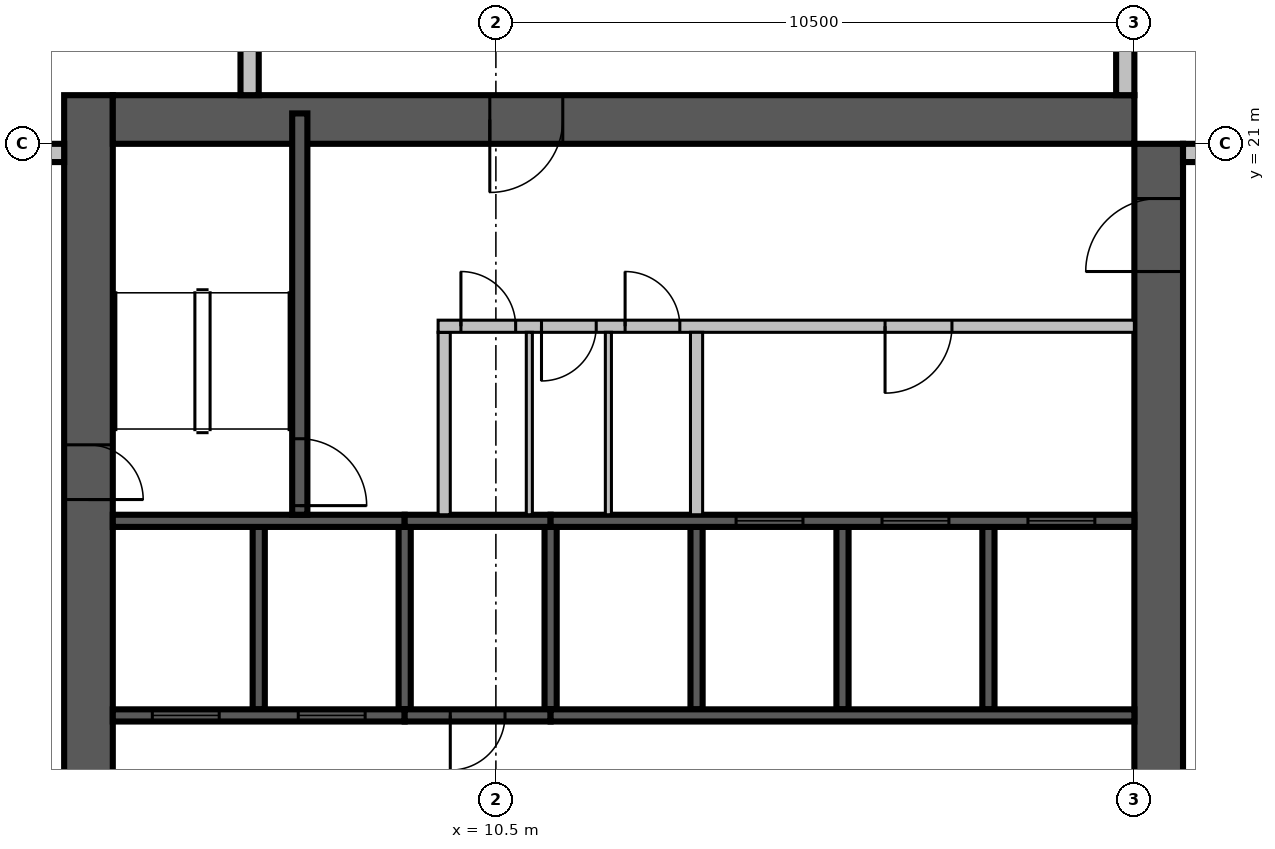
"""IFC4 building model, lengths in metres.
Left out: names, types, materials, properties, quantities, classifications, styles, units other than length and angle.
Written with IfcOpenShell. Run it as: python <this file> out.ifc"""

import sys

from ifc_helpers import new_model, si_unit, direction, frame, frame_2d, origin, place, context, subcontext, project, spatial, rectangle, extrude, source, transform, mapped, element, fill, save


model = new_model("IFC4")
c1 = context("Model", 3, precision=1e-05, world=origin(), true_north=direction((0.0, 1.0)))
c2 = subcontext(c1, "Body", "Model", "MODEL_VIEW")
j1 = project(units=[si_unit("LENGTHUNIT", "METRE"), si_unit("PLANEANGLEUNIT", "RADIAN")], contexts=[c1])
p1 = place(None, origin())
s1 = spatial("IfcSite", under=j1, at=p1, CompositionType="ELEMENT")
p2 = place(p1, origin())
s2 = spatial("IfcBuilding", under=s1, at=p2, CompositionType="ELEMENT")
p3 = place(p2, frame((0.0, 0.0, 177.8)))
s3 = spatial("IfcBuildingStorey", under=s2, at=p3, CompositionType="ELEMENT", Elevation=177.8)
p4 = place(p3, frame((3.8, 4.2, 0.0), z_axis=(0.0, 0.0, 1.0), x_axis=(0.0, 1.0, 0.0)))
e1 = element("IfcWall", 1, at=p4, inside=s3, PredefinedType="SHEAR", context=c2, shape_type="SweptSolid", body=[
    extrude(rectangle(XDim=17.6, YDim=0.8, at=frame_2d((8.8, 0.0))), origin(), (0.0, 0.0, 1.0), 3.8),
])
m1 = source(origin(), c2, "Body", "SweptSolid", [
    extrude(rectangle(XDim=2.2, YDim=2.1, at=frame_2d((1.1, 1.05))), frame((0.0, 0.41, 0.0), z_axis=(0.0, -1.0, 0.0), x_axis=(1.0, 0.0, 0.0)), (0.0, 0.0, 1.0), 0.82),
])
p5 = place(p4, frame((4.2, 0.0, 0.0)))
e2 = element("IfcOpeningElement", 2, at=p5, cuts=e1, PredefinedType="OPENING", context=c2, shape_type="MappedRepresentation", body=[
    mapped(m1, transform((0.0, 0.0, 0.0), scale=1.0)),
])
p6 = place(p4, frame((10.95, 0.0, 0.0)))
e3 = element("IfcOpeningElement", 3, at=p6, cuts=e1, PredefinedType="OPENING", context=c2, shape_type="SweptSolid", body=[
    extrude(rectangle(XDim=0.9, YDim=2.1, at=frame_2d((0.45, 1.05))), frame((0.0, 0.41, 0.0), z_axis=(0.0, -1.0, 0.0), x_axis=(1.0, 0.0, 0.0)), (0.0, 0.0, 1.0), 0.82),
])
p7 = place(p3, frame((21.4, 4.2, 0.0), z_axis=(0.0, 0.0, 1.0), x_axis=(0.0, 1.0, 0.0)))
e4 = element("IfcWall", 4, at=p7, inside=s3, PredefinedType="SHEAR", context=c2, shape_type="SweptSolid", body=[
    extrude(rectangle(XDim=16.8, YDim=0.8, at=frame_2d((8.4, 0.0))), origin(), (0.0, 0.0, 1.0), 3.8),
])
p8 = place(p7, frame((4.2, 0.0, 0.0)))
e5 = element("IfcOpeningElement", 5, at=p8, cuts=e4, PredefinedType="OPENING", context=c2, shape_type="SweptSolid", body=[
    extrude(rectangle(XDim=2.2, YDim=2.1, at=frame_2d((1.1, 1.05))), frame((0.0, 0.41, 0.0), z_axis=(0.0, -1.0, 0.0), x_axis=(1.0, 0.0, 0.0)), (0.0, 0.0, 1.0), 0.82),
])
m2 = source(origin(), c2, "Body", "SweptSolid", [
    extrude(rectangle(XDim=1.2, YDim=2.1, at=frame_2d((0.6, 1.05))), frame((0.0, 0.41, 0.0), z_axis=(0.0, -1.0, 0.0), x_axis=(1.0, 0.0, 0.0)), (0.0, 0.0, 1.0), 0.82),
])
p9 = place(p7, frame((14.7, 0.0, 0.0)))
e6 = element("IfcOpeningElement", 6, at=p9, cuts=e4, PredefinedType="OPENING", context=c2, shape_type="MappedRepresentation", body=[
    mapped(m2, transform((0.0, 0.0, 0.0), scale=1.0)),
])
m3 = source(origin(), c2, "Body", "SweptSolid", [
    extrude(rectangle(XDim=16.8, YDim=0.8, at=frame_2d((8.4, 0.0))), origin(), (0.0, 0.0, 1.0), 3.8),
])
p10 = place(p3, frame((4.2, 21.4, 0.0), z_axis=(0.0, 0.0, 1.0), x_axis=(1.0, 0.0, 0.0)))
e7 = element("IfcWall", 7, at=p10, inside=s3, PredefinedType="SHEAR", context=c2, shape_type="MappedRepresentation", body=[
    mapped(m3, transform((0.0, 0.0, 0.0), scale=1.0)),
])
p11 = place(p10, frame((6.2, 0.0, 0.0)))
e8 = element("IfcOpeningElement", 8, at=p11, cuts=e7, PredefinedType="OPENING", context=c2, shape_type="SweptSolid", body=[
    extrude(rectangle(XDim=1.2, YDim=2.1, at=frame_2d((0.6, 1.05))), frame((0.0, 0.41, 0.0), z_axis=(0.0, -1.0, 0.0), x_axis=(1.0, 0.0, 0.0)), (0.0, 0.0, 1.0), 0.82),
])
p12 = place(p3, frame((28.95, 20.85, 0.0), z_axis=(0.0, 0.0, 1.0), x_axis=(-1.0, 0.0, 0.0)))
e9 = element("IfcWall", 9, at=p12, inside=s3, PredefinedType="STANDARD", context=c2, shape_type="SweptSolid", body=[
    extrude(rectangle(XDim=7.15, YDim=0.3, at=frame_2d((3.575, 0.0))), origin(), (0.0, 0.0, 1.0), 3.4),
])
m4 = source(origin(), c2, "Body", "SweptSolid", [
    extrude(rectangle(XDim=3.0, YDim=2.3, at=frame_2d((1.5, 1.15))), frame((0.0, 0.16, 0.0), z_axis=(0.0, -1.0, 0.0), x_axis=(1.0, 0.0, 0.0)), (0.0, 0.0, 1.0), 0.32),
])
p13 = place(p12, frame((0.15, 0.0, 0.6)))
e10 = element("IfcOpeningElement", 10, at=p13, cuts=e9, PredefinedType="OPENING", context=c2, shape_type="MappedRepresentation", body=[
    mapped(m4, transform((0.0, 0.0, 0.0), scale=1.0)),
])
m5 = source(origin(), c2, "Body", "SweptSolid", [
    extrude(rectangle(XDim=7.15, YDim=0.3, at=frame_2d((3.575, 0.0))), origin(), (0.0, 0.0, 1.0), 3.4),
])
p14 = place(p3, frame((20.85, 21.8, 0.0), z_axis=(0.0, 0.0, 1.0), x_axis=(0.0, 1.0, 0.0)))
e11 = element("IfcWall", 11, at=p14, inside=s3, PredefinedType="STANDARD", context=c2, shape_type="MappedRepresentation", body=[
    mapped(m5, transform((0.0, 0.0, 0.0), scale=1.0)),
])
p15 = place(p14, frame((4.0, 0.0, 0.6)))
e12 = element("IfcOpeningElement", 12, at=p15, cuts=e11, PredefinedType="OPENING", context=c2, shape_type="MappedRepresentation", body=[
    mapped(m4, transform((0.0, 0.0, 0.0), scale=1.0)),
])
p16 = place(p3, frame((6.45, 38.4, 0.0), z_axis=(0.0, 0.0, 1.0), x_axis=(0.0, -1.0, 0.0)))
e13 = element("IfcWall", 13, at=p16, inside=s3, PredefinedType="STANDARD", context=c2, shape_type="SweptSolid", body=[
    extrude(rectangle(XDim=16.6, YDim=0.3, at=frame_2d((8.3, 0.0))), origin(), (0.0, 0.0, 1.0), 3.4),
])
m6 = source(origin(), c2, "Body", "SweptSolid", [
    extrude(rectangle(XDim=1.8, YDim=2.3, at=frame_2d((0.9, 1.15))), frame((0.0, 0.16, 0.0), z_axis=(0.0, -1.0, 0.0), x_axis=(1.0, 0.0, 0.0)), (0.0, 0.0, 1.0), 0.32),
])
p17 = place(p16, frame((1.15, 0.0, 0.6)))
e14 = element("IfcOpeningElement", 14, at=p17, cuts=e13, PredefinedType="OPENING", context=c2, shape_type="MappedRepresentation", body=[
    mapped(m6, transform((0.0, 0.0, 0.0), scale=1.0)),
])
p18 = place(p16, frame((5.162, 0.0, 0.6)))
e15 = element("IfcOpeningElement", 15, at=p18, cuts=e13, PredefinedType="OPENING", context=c2, shape_type="MappedRepresentation", body=[
    mapped(m6, transform((0.0, 0.0, 0.0), scale=1.0)),
])
p19 = place(p16, frame((9.438, 0.0, 0.6)))
e16 = element("IfcOpeningElement", 16, at=p19, cuts=e13, PredefinedType="OPENING", context=c2, shape_type="MappedRepresentation", body=[
    mapped(m6, transform((0.0, 0.0, 0.0), scale=1.0)),
])
m7 = source(origin(), c2, "Body", "SweptSolid", [
    extrude(rectangle(XDim=1.2, YDim=2.3, at=frame_2d((0.6, 1.15))), frame((0.0, 0.16, 0.0), z_axis=(0.0, -1.0, 0.0), x_axis=(1.0, 0.0, 0.0)), (0.0, 0.0, 1.0), 0.32),
])
p20 = place(p16, frame((13.012, 0.0, 0.6)))
e17 = element("IfcOpeningElement", 17, at=p20, cuts=e13, PredefinedType="OPENING", context=c2, shape_type="MappedRepresentation", body=[
    mapped(m7, transform((0.0, 0.0, 0.0), scale=1.0)),
])
p21 = place(p3, frame((3.4, 20.85, 0.0), z_axis=(0.0, 0.0, 1.0), x_axis=(-1.0, 0.0, 0.0)))
e18 = element("IfcWall", 18, at=p21, inside=s3, PredefinedType="STANDARD", context=c2, shape_type="SweptSolid", body=[
    extrude(rectangle(XDim=2.5, YDim=0.3, at=frame_2d((1.25, 0.0))), origin(), (0.0, 0.0, 1.0), 3.4),
])
p22 = place(p21, frame((0.4, 0.0, 0.6)))
e19 = element("IfcOpeningElement", 19, at=p22, cuts=e18, PredefinedType="OPENING", context=c2, shape_type="MappedRepresentation", body=[
    mapped(m6, transform((0.0, 0.0, 0.0), scale=1.0)),
])
p23 = place(p3, frame((6.6, 11.7, 0.0), z_axis=(0.0, 0.0, 1.0), x_axis=(0.0, 1.0, 0.0)))
e20 = element("IfcWall", 20, at=p23, inside=s3, PredefinedType="SOLIDWALL", context=c2, shape_type="SweptSolid", body=[
    extrude(rectangle(XDim=3.0, YDim=0.2, at=frame_2d((1.5, 0.0))), origin(), (0.0, 0.0, 1.0), 3.8),
])
p24 = place(p3, frame((9.0, 11.7, 0.0), z_axis=(0.0, 0.0, 1.0), x_axis=(0.0, 1.0, 0.0)))
e21 = element("IfcWall", 21, at=p24, inside=s3, PredefinedType="SOLIDWALL", context=c2, shape_type="SweptSolid", body=[
    extrude(rectangle(XDim=3.0, YDim=0.2, at=frame_2d((1.5, 0.0))), origin(), (0.0, 0.0, 1.0), 3.4),
])
m8 = source(origin(), c2, "Body", "SweptSolid", [
    extrude(rectangle(XDim=3.0, YDim=0.2, at=frame_2d((1.5, 0.0))), origin(), (0.0, 0.0, 1.0), 3.4),
])
p25 = place(p3, frame((11.4, 11.7, 0.0), z_axis=(0.0, 0.0, 1.0), x_axis=(0.0, 1.0, 0.0)))
e22 = element("IfcWall", 22, at=p25, inside=s3, PredefinedType="SOLIDWALL", context=c2, shape_type="MappedRepresentation", body=[
    mapped(m8, transform((0.0, 0.0, 0.0), scale=1.0)),
])
m9 = source(origin(), c2, "Body", "SweptSolid", [
    extrude(rectangle(XDim=3.0, YDim=0.2, at=frame_2d((1.5, 0.0))), origin(), (0.0, 0.0, 1.0), 3.8),
])
for number, where, z_axis, x_axis in (
    (23, (13.8, 11.7, 0.0), (0.0, 0.0, 1.0), (0.0, 1.0, 0.0)),
    (24, (16.2, 11.7, 0.0), (0.0, 0.0, 1.0), (0.0, 1.0, 0.0)),
    (25, (18.6, 11.7, 0.0), (0.0, 0.0, 1.0), (0.0, 1.0, 0.0)),
):
    element("IfcWall", number, at=place(p3, frame(where, z_axis=z_axis, x_axis=x_axis)), inside=s3, PredefinedType="SOLIDWALL", context=c2, shape_type="MappedRepresentation", body=[
        mapped(m9, transform((0.0, 0.0, 0.0), scale=1.0)),
    ])
p26 = place(p3, frame((4.2, 11.6, 0.0), z_axis=(0.0, 0.0, 1.0), x_axis=(1.0, 0.0, 0.0)))
e26 = element("IfcWall", 26, at=p26, inside=s3, PredefinedType="SOLIDWALL", context=c2, shape_type="SweptSolid", body=[
    extrude(rectangle(XDim=4.8, YDim=0.2, at=frame_2d((2.4, 0.0))), origin(), (0.0, 0.0, 1.0), 3.8),
])
m10 = source(origin(), c2, "Body", "SweptSolid", [
    extrude(rectangle(XDim=1.1, YDim=2.1, at=frame_2d((0.55, 1.05))), frame((0.0, 0.11, 0.0), z_axis=(0.0, -1.0, 0.0), x_axis=(1.0, 0.0, 0.0)), (0.0, 0.0, 1.0), 0.22),
])
p27 = place(p26, frame((0.65, 0.0, 0.0)))
e27 = element("IfcOpeningElement", 27, at=p27, cuts=e26, PredefinedType="OPENING", context=c2, shape_type="MappedRepresentation", body=[
    mapped(m10, transform((0.0, 0.0, 0.0), scale=1.0)),
])
p28 = place(p26, frame((3.05, 0.0, 0.0)))
e28 = element("IfcOpeningElement", 28, at=p28, cuts=e26, PredefinedType="OPENING", context=c2, shape_type="MappedRepresentation", body=[
    mapped(m10, transform((0.0, 0.0, 0.0), scale=1.0)),
])
p29 = place(p3, frame((9.0, 11.6, 0.0), z_axis=(0.0, 0.0, 1.0), x_axis=(1.0, 0.0, 0.0)))
e29 = element("IfcWall", 29, at=p29, inside=s3, PredefinedType="SOLIDWALL", context=c2, shape_type="SweptSolid", body=[
    extrude(rectangle(XDim=2.4, YDim=0.2, at=frame_2d((1.2, 0.0))), origin(), (0.0, 0.0, 1.0), 3.4),
])
m11 = source(origin(), c2, "Body", "SweptSolid", [
    extrude(rectangle(XDim=0.9, YDim=2.1, at=frame_2d((0.45, 1.05))), frame((0.0, 0.11, 0.0), z_axis=(0.0, -1.0, 0.0), x_axis=(1.0, 0.0, 0.0)), (0.0, 0.0, 1.0), 0.22),
])
p30 = place(p29, frame((0.75, 0.0, 0.0)))
e30 = element("IfcOpeningElement", 30, at=p30, cuts=e29, PredefinedType="OPENING", context=c2, shape_type="MappedRepresentation", body=[
    mapped(m11, transform((0.0, 0.0, 0.0), scale=1.0)),
])
m12 = source(origin(), c2, "Body", "SweptSolid", [
    extrude(rectangle(XDim=9.6, YDim=0.2, at=frame_2d((4.8, 0.0))), origin(), (0.0, 0.0, 1.0), 3.8),
])
p31 = place(p3, frame((11.4, 11.6, 0.0), z_axis=(0.0, 0.0, 1.0), x_axis=(1.0, 0.0, 0.0)))
e31 = element("IfcWall", 31, at=p31, inside=s3, PredefinedType="SOLIDWALL", context=c2, shape_type="MappedRepresentation", body=[
    mapped(m12, transform((0.0, 0.0, 0.0), scale=1.0)),
])
m13 = source(origin(), c2, "Body", "SweptSolid", [
    extrude(rectangle(XDim=4.8, YDim=0.2, at=frame_2d((2.4, 0.0))), origin(), (0.0, 0.0, 1.0), 3.8),
])
p32 = place(p3, frame((4.2, 14.8, 0.0), z_axis=(0.0, 0.0, 1.0), x_axis=(1.0, 0.0, 0.0)))
e32 = element("IfcWall", 32, at=p32, inside=s3, PredefinedType="SOLIDWALL", context=c2, shape_type="MappedRepresentation", body=[
    mapped(m13, transform((0.0, 0.0, 0.0), scale=1.0)),
])
m14 = source(origin(), c2, "Body", "SweptSolid", [
    extrude(rectangle(XDim=2.4, YDim=0.2, at=frame_2d((1.2, 0.0))), origin(), (0.0, 0.0, 1.0), 3.4),
])
p33 = place(p3, frame((9.0, 14.8, 0.0), z_axis=(0.0, 0.0, 1.0), x_axis=(1.0, 0.0, 0.0)))
e33 = element("IfcWall", 33, at=p33, inside=s3, PredefinedType="SOLIDWALL", context=c2, shape_type="MappedRepresentation", body=[
    mapped(m14, transform((0.0, 0.0, 0.0), scale=1.0)),
])
p34 = place(p3, frame((11.4, 14.8, 0.0), z_axis=(0.0, 0.0, 1.0), x_axis=(1.0, 0.0, 0.0)))
e34 = element("IfcWall", 34, at=p34, inside=s3, PredefinedType="SOLIDWALL", context=c2, shape_type="MappedRepresentation", body=[
    mapped(m12, transform((0.0, 0.0, 0.0), scale=1.0)),
])
p35 = place(p34, frame((3.05, 0.0, 0.0)))
e35 = element("IfcOpeningElement", 35, at=p35, cuts=e34, PredefinedType="OPENING", context=c2, shape_type="MappedRepresentation", body=[
    mapped(m10, transform((0.0, 0.0, 0.0), scale=1.0)),
])
p36 = place(p34, frame((5.45, 0.0, 0.0)))
e36 = element("IfcOpeningElement", 36, at=p36, cuts=e34, PredefinedType="OPENING", context=c2, shape_type="MappedRepresentation", body=[
    mapped(m10, transform((0.0, 0.0, 0.0), scale=1.0)),
])
p37 = place(p34, frame((7.85, 0.0, 0.0)))
e37 = element("IfcOpeningElement", 37, at=p37, cuts=e34, PredefinedType="OPENING", context=c2, shape_type="MappedRepresentation", body=[
    mapped(m10, transform((0.0, 0.0, 0.0), scale=1.0)),
])
p38 = place(p3, frame((7.275, 14.9, 0.0), z_axis=(0.0, 0.0, 1.0), x_axis=(0.0, 1.0, 0.0)))
e38 = element("IfcWall", 38, at=p38, inside=s3, PredefinedType="SOLIDWALL", context=c2, shape_type="SweptSolid", body=[
    extrude(rectangle(XDim=6.6, YDim=0.25, at=frame_2d((3.3, 0.0))), origin(), (0.0, 0.0, 1.0), 3.4),
])
m15 = source(origin(), c2, "Body", "SweptSolid", [
    extrude(rectangle(XDim=1.1, YDim=2.1, at=frame_2d((0.55, 1.05))), frame((0.0, 0.135, 0.0), z_axis=(0.0, -1.0, 0.0), x_axis=(1.0, 0.0, 0.0)), (0.0, 0.0, 1.0), 0.27),
])
p39 = place(p38, frame((0.15, 0.0, 0.0)))
e39 = element("IfcOpeningElement", 39, at=p39, cuts=e38, PredefinedType="OPENING", context=c2, shape_type="MappedRepresentation", body=[
    mapped(m15, transform((0.0, 0.0, 0.0), scale=1.0)),
])
p40 = place(p3, frame((9.65, 14.9, 0.0), z_axis=(0.0, 0.0, 1.0), x_axis=(0.0, 1.0, 0.0)))
e40 = element("IfcWall", 40, at=p40, inside=s3, PredefinedType="PARTITIONING", context=c2, shape_type="SweptSolid", body=[
    extrude(rectangle(XDim=3.0, YDim=0.2, at=frame_2d((1.5, 0.0))), origin(), (0.0, 0.0, 1.0), 3.4),
])
p41 = place(p3, frame((9.55, 18.0, 0.0), z_axis=(0.0, 0.0, 1.0), x_axis=(1.0, 0.0, 0.0)))
e41 = element("IfcWall", 41, at=p41, inside=s3, PredefinedType="PARTITIONING", context=c2, shape_type="SweptSolid", body=[
    extrude(rectangle(XDim=11.45, YDim=0.2, at=frame_2d((5.725, 0.0))), origin(), (0.0, 0.0, 1.0), 3.4),
])
p42 = place(p41, frame((0.375, 0.0, 0.0)))
e42 = element("IfcOpeningElement", 42, at=p42, cuts=e41, PredefinedType="OPENING", context=c2, shape_type="MappedRepresentation", body=[
    mapped(m11, transform((0.0, 0.0, 0.0), scale=1.0)),
])
p43 = place(p41, frame((1.7, 0.0, 0.0)))
e43 = element("IfcOpeningElement", 43, at=p43, cuts=e41, PredefinedType="OPENING", context=c2, shape_type="MappedRepresentation", body=[
    mapped(m11, transform((0.0, 0.0, 0.0), scale=1.0)),
])
p44 = place(p41, frame((3.075, 0.0, 0.0)))
e44 = element("IfcOpeningElement", 44, at=p44, cuts=e41, PredefinedType="OPENING", context=c2, shape_type="MappedRepresentation", body=[
    mapped(m11, transform((0.0, 0.0, 0.0), scale=1.0)),
])
p45 = place(p41, frame((7.35, 0.0, 0.0)))
e45 = element("IfcOpeningElement", 45, at=p45, cuts=e41, PredefinedType="OPENING", context=c2, shape_type="MappedRepresentation", body=[
    mapped(m10, transform((0.0, 0.0, 0.0), scale=1.0)),
])
m16 = source(origin(), c2, "Body", "SweptSolid", [
    extrude(rectangle(XDim=3.0, YDim=0.2, at=frame_2d((1.5, 0.0))), origin(), (0.0, 0.0, 1.0), 3.4),
])
p46 = place(p3, frame((13.8, 14.9, 0.0), z_axis=(0.0, 0.0, 1.0), x_axis=(0.0, 1.0, 0.0)))
e46 = element("IfcWall", 46, at=p46, inside=s3, PredefinedType="PARTITIONING", context=c2, shape_type="MappedRepresentation", body=[
    mapped(m16, transform((0.0, 0.0, 0.0), scale=1.0)),
])
p47 = place(p3, frame((11.05, 14.9, 0.0), z_axis=(0.0, 0.0, 1.0), x_axis=(0.0, 1.0, 0.0)))
e47 = element("IfcWall", 47, at=p47, inside=s3, PredefinedType="PARTITIONING", context=c2, shape_type="SweptSolid", body=[
    extrude(rectangle(XDim=3.0, YDim=0.1, at=frame_2d((1.5, 0.0))), origin(), (0.0, 0.0, 1.0), 3.4),
])
m17 = source(origin(), c2, "Body", "SweptSolid", [
    extrude(rectangle(XDim=3.0, YDim=0.1, at=frame_2d((1.5, 0.0))), origin(), (0.0, 0.0, 1.0), 3.4),
])
p48 = place(p3, frame((12.35, 14.9, 0.0), z_axis=(0.0, 0.0, 1.0), x_axis=(0.0, 1.0, 0.0)))
e48 = element("IfcWall", 48, at=p48, inside=s3, PredefinedType="PARTITIONING", context=c2, shape_type="MappedRepresentation", body=[
    mapped(m17, transform((0.0, 0.0, 0.0), scale=1.0)),
])
m18 = source(origin(), c2, "Body", "SweptSolid", [
    extrude(rectangle(XDim=1.1, YDim=2.1, at=frame_2d((0.55, 1.05))), frame((0.0, 0.025, 0.0), z_axis=(0.0, -1.0, 0.0), x_axis=(1.0, 0.0, 0.0)), (0.0, 0.0, 1.0), 0.05),
])
p49 = place(p27, origin())
e49 = element("IfcDoor", 49, at=p49, inside=s3, OperationType="SLIDING_TO_LEFT", PredefinedType="DOOR", context=c2, shape_type="MappedRepresentation", body=[
    mapped(m18, transform((0.0, 0.0, 0.0), scale=1.0)),
])
fill(e27, e49)
p50 = place(p28, origin())
e50 = element("IfcDoor", 50, at=p50, inside=s3, OperationType="SLIDING_TO_LEFT", PredefinedType="DOOR", context=c2, shape_type="MappedRepresentation", body=[
    mapped(m18, transform((0.0, 0.0, 0.0), scale=1.0)),
])
fill(e28, e50)
m19 = source(origin(), c2, "Body", "SweptSolid", [
    extrude(rectangle(XDim=0.9, YDim=2.1, at=frame_2d((0.45, 1.05))), frame((0.0, 0.025, 0.0), z_axis=(0.0, -1.0, 0.0), x_axis=(1.0, 0.0, 0.0)), (0.0, 0.0, 1.0), 0.05),
])
p51 = place(p30, origin())
e51 = element("IfcDoor", 51, at=p51, inside=s3, OperationType="SINGLE_SWING_RIGHT", PredefinedType="DOOR", context=c2, shape_type="MappedRepresentation", body=[
    mapped(m19, transform((0.0, 0.0, 0.0), scale=1.0)),
])
fill(e30, e51)
p52 = place(p35, origin())
e52 = element("IfcDoor", 52, at=p52, inside=s3, OperationType="SLIDING_TO_LEFT", PredefinedType="DOOR", context=c2, shape_type="MappedRepresentation", body=[
    mapped(m18, transform((0.0, 0.0, 0.0), scale=1.0)),
])
fill(e35, e52)
p53 = place(p36, origin())
e53 = element("IfcDoor", 53, at=p53, inside=s3, OperationType="SLIDING_TO_LEFT", PredefinedType="DOOR", context=c2, shape_type="MappedRepresentation", body=[
    mapped(m18, transform((0.0, 0.0, 0.0), scale=1.0)),
])
fill(e36, e53)
p54 = place(p37, origin())
e54 = element("IfcDoor", 54, at=p54, inside=s3, OperationType="SLIDING_TO_LEFT", PredefinedType="DOOR", context=c2, shape_type="MappedRepresentation", body=[
    mapped(m18, transform((0.0, 0.0, 0.0), scale=1.0)),
])
fill(e37, e54)
p55 = place(p39, origin())
e55 = element("IfcDoor", 55, at=p55, inside=s3, OperationType="SINGLE_SWING_RIGHT", PredefinedType="DOOR", context=c2, shape_type="MappedRepresentation", body=[
    mapped(m18, transform((0.0, 0.0, 0.0), scale=1.0)),
])
fill(e39, e55)
p56 = place(p42, origin())
e56 = element("IfcDoor", 56, at=p56, inside=s3, OperationType="SINGLE_SWING_LEFT", PredefinedType="DOOR", context=c2, shape_type="MappedRepresentation", body=[
    mapped(m19, transform((0.0, 0.0, 0.0), scale=1.0)),
])
fill(e42, e56)
p57 = place(p43, origin())
e57 = element("IfcDoor", 57, at=p57, inside=s3, OperationType="SINGLE_SWING_RIGHT", PredefinedType="DOOR", context=c2, shape_type="MappedRepresentation", body=[
    mapped(m19, transform((0.0, 0.0, 0.0), scale=1.0)),
])
fill(e43, e57)
p58 = place(p44, origin())
e58 = element("IfcDoor", 58, at=p58, inside=s3, OperationType="SINGLE_SWING_LEFT", PredefinedType="DOOR", context=c2, shape_type="MappedRepresentation", body=[
    mapped(m19, transform((0.0, 0.0, 0.0), scale=1.0)),
])
fill(e44, e58)
p59 = place(p45, origin())
e59 = element("IfcDoor", 59, at=p59, inside=s3, OperationType="SINGLE_SWING_RIGHT", PredefinedType="DOOR", context=c2, shape_type="MappedRepresentation", body=[
    mapped(m18, transform((0.0, 0.0, 0.0), scale=1.0)),
])
fill(e45, e59)
m20 = source(origin(), c2, "Body", "SweptSolid", [
    extrude(rectangle(XDim=1.2, YDim=2.1, at=frame_2d((0.6, 1.05))), frame((0.0, 0.025, 0.0), z_axis=(0.0, -1.0, 0.0), x_axis=(1.0, 0.0, 0.0)), (0.0, 0.0, 1.0), 0.05),
])
p60 = place(p11, origin())
e60 = element("IfcDoor", 60, at=p60, inside=s3, OperationType="SINGLE_SWING_RIGHT", PredefinedType="DOOR", context=c2, shape_type="MappedRepresentation", body=[
    mapped(m20, transform((0.0, 0.0, 0.0), scale=1.0)),
])
fill(e8, e60)
p61 = place(p9, origin())
e61 = element("IfcDoor", 61, at=p61, inside=s3, OperationType="SINGLE_SWING_LEFT", PredefinedType="DOOR", context=c2, shape_type="MappedRepresentation", body=[
    mapped(m20, transform((0.0, 0.0, 0.0), scale=1.0)),
])
fill(e6, e61)
p62 = place(p6, origin())
e62 = element("IfcDoor", 62, at=p62, inside=s3, OperationType="SINGLE_SWING_RIGHT", PredefinedType="DOOR", context=c2, shape_type="MappedRepresentation", body=[
    mapped(m19, transform((0.0, 0.0, 0.0), scale=1.0)),
])
fill(e3, e62)
save(model, sys.argv[1])
